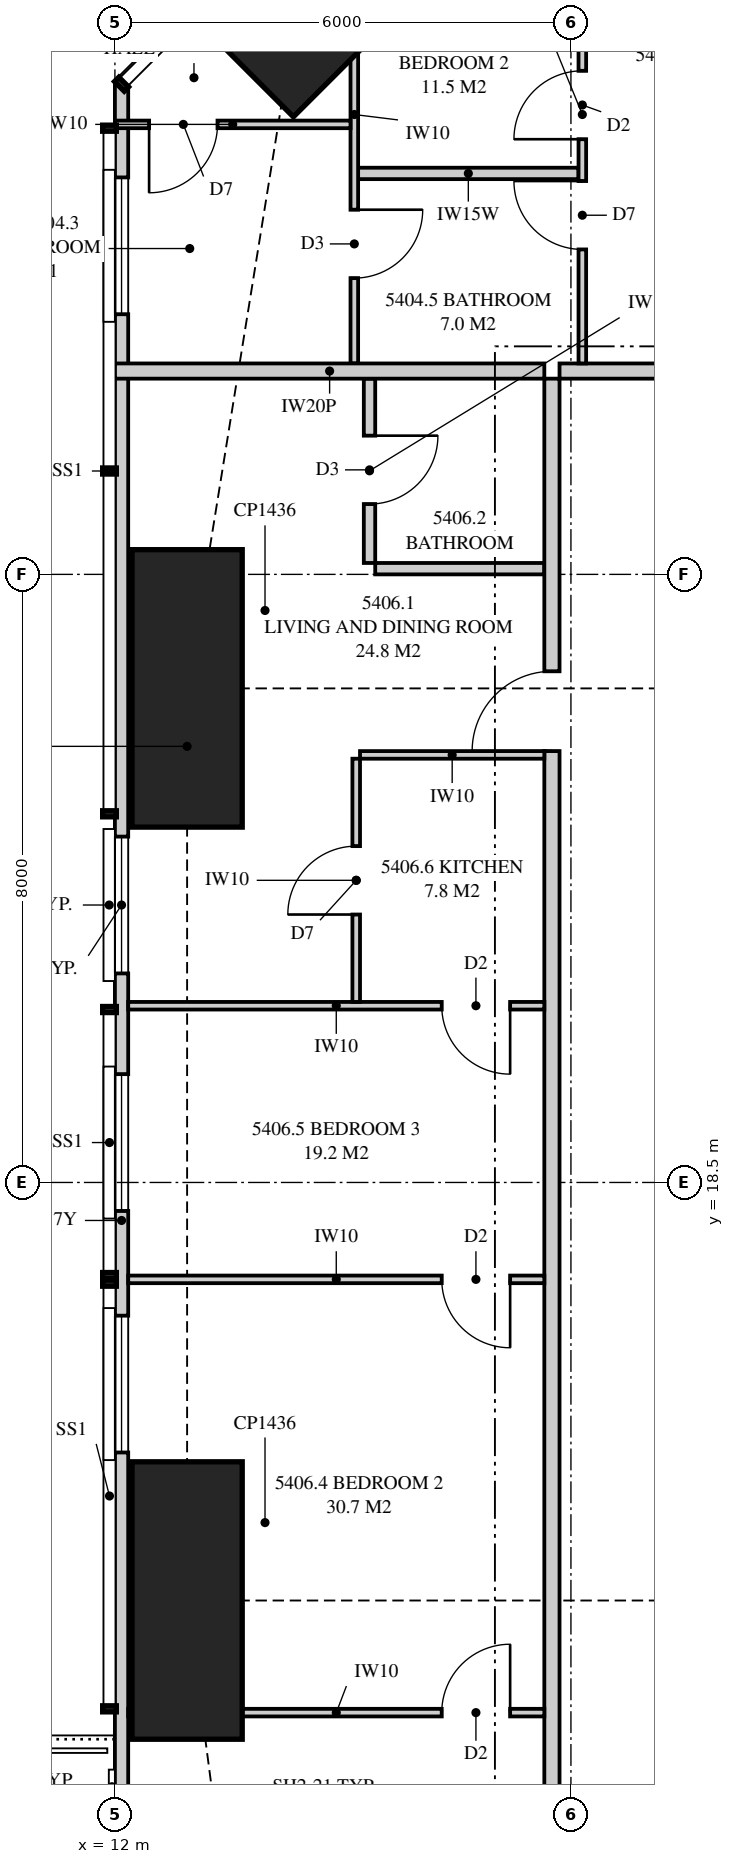
"""IFC4 building model, lengths in metres.
Left out: names, types, materials, properties, quantities, classifications, styles, units other than length and angle.
Written with IfcOpenShell. Run it as: python <this file> out.ifc"""

import sys

from ifc_helpers import new_model, si_unit, direction, frame, frame_2d, origin, origin_2d, place, context, subcontext, project, spatial, polyline, rectangle, outline, extrude, element, fill, save


model = new_model("IFC4")
c1 = context("Model", 3, precision=1e-05, world=origin(), true_north=direction((0.0, 1.0)))
c2 = subcontext(c1, "Body", "Model", "MODEL_VIEW")
j1 = project(units=[si_unit("LENGTHUNIT", "METRE"), si_unit("PLANEANGLEUNIT", "RADIAN")], contexts=[c1])
p1 = place(None, origin())
s1 = spatial("IfcSite", under=j1, at=p1, CompositionType="ELEMENT")
p2 = place(p1, origin())
s2 = spatial("IfcBuilding", under=s1, at=p2, CompositionType="ELEMENT")
p3 = place(p2, frame((0.0, 0.0, 197.9)))
s3 = spatial("IfcBuildingStorey", under=s2, at=p3, CompositionType="ELEMENT", Elevation=197.9)
p4 = place(p3, frame((14.348, 33.652, 0.0), z_axis=(0.0, 0.0, 1.0), x_axis=(0.707106781187, 0.707106781187, 0.0)))
e1 = element("IfcColumn", 1, at=p4, inside=s3, PredefinedType="COLUMN", context=c2, shape_type="SweptSolid", body=[
    extrude(rectangle(XDim=1.6, YDim=1.6, at=origin_2d()), origin(), (0.0, 0.0, 1.0), 3.35),
])
for number, where, z_axis, x_axis in (
    (2, (12.95, 25.0, 0.0), (0.0, 0.0, 1.0), (1.0, 0.0, 0.0)),
    (3, (12.95, 13.0, 0.0), (0.0, 0.0, 1.0), (1.0, 0.0, 0.0)),
):
    element("IfcColumn", number, at=place(p3, frame(where, z_axis=z_axis, x_axis=x_axis)), inside=s3, PredefinedType="COLUMN", context=c2, shape_type="SweptSolid", body=[
        extrude(rectangle(XDim=1.45, YDim=3.65, at=origin_2d()), origin(), (0.0, 0.0, 1.0), 3.35),
    ])
p5 = place(p3, frame((12.087, 32.949, 0.0), z_axis=(0.0, 0.0, 1.0), x_axis=(0.0, -1.0, 0.0)))
e4 = element("IfcWall", 4, at=p5, inside=s3, PredefinedType="SOLIDWALL", context=c2, shape_type="SweptSolid", body=[
    extrude(outline(polyline([(0.0, 0.0), (29.897, 0.0), (29.897, 3.11), (20.191, 3.11), (20.191, 2.15), (20.051, 2.15), (20.051, 3.11), (19.949, 3.11), (19.949, 2.15), (7.949, 2.15), (7.949, 3.11), (7.823, 3.11), (7.823, 2.15), (7.73, 2.15), (7.73, 3.11), (0.0, 3.11), (0.0, 0.0)])), frame((0.0, 0.087, 0.0), z_axis=(0.0, -1.0, 0.0), x_axis=(1.0, 0.0, 0.0)), (0.0, 0.0, 1.0), 0.175),
])
p6 = place(p5, frame((1.226, 0.0, 0.4)))
e5 = element("IfcOpeningElement", 5, at=p6, cuts=e4, PredefinedType="OPENING", context=c2, shape_type="SweptSolid", body=[
    extrude(rectangle(XDim=1.8, YDim=1.7, at=frame_2d((0.9, 0.85))), frame((0.0, 0.097, 0.0), z_axis=(0.0, -1.0, 0.0), x_axis=(1.0, 0.0, 0.0)), (0.0, 0.0, 1.0), 0.195),
])
p7 = place(p5, frame((9.899, 0.0, 0.4)))
e6 = element("IfcOpeningElement", 6, at=p7, cuts=e4, PredefinedType="OPENING", context=c2, shape_type="SweptSolid", body=[
    extrude(rectangle(XDim=1.8, YDim=1.7, at=frame_2d((0.9, 0.85))), frame((0.0, 0.097, 0.0), z_axis=(0.0, -1.0, 0.0), x_axis=(1.0, 0.0, 0.0)), (0.0, 0.0, 1.0), 0.195),
])
p8 = place(p5, frame((13.024, 0.0, 0.4)))
e7 = element("IfcOpeningElement", 7, at=p8, cuts=e4, PredefinedType="OPENING", context=c2, shape_type="SweptSolid", body=[
    extrude(rectangle(XDim=1.8, YDim=1.7, at=frame_2d((0.9, 0.85))), frame((0.0, 0.097, 0.0), z_axis=(0.0, -1.0, 0.0), x_axis=(1.0, 0.0, 0.0)), (0.0, 0.0, 1.0), 0.195),
])
p9 = place(p5, frame((16.201, 0.0, 0.4)))
e8 = element("IfcOpeningElement", 8, at=p9, cuts=e4, PredefinedType="OPENING", context=c2, shape_type="SweptSolid", body=[
    extrude(rectangle(XDim=1.8, YDim=1.7, at=frame_2d((0.9, 0.85))), frame((0.0, 0.097, 0.0), z_axis=(0.0, -1.0, 0.0), x_axis=(1.0, 0.0, 0.0)), (0.0, 0.0, 1.0), 0.195),
])
p10 = place(p5, frame((22.624, 0.0, 0.0)))
e9 = element("IfcOpeningElement", 9, at=p10, cuts=e4, PredefinedType="OPENING", context=c2, shape_type="SweptSolid", body=[
    extrude(rectangle(XDim=1.8, YDim=2.1, at=frame_2d((0.9, 1.05))), frame((0.0, 0.097, 0.0), z_axis=(0.0, -1.0, 0.0), x_axis=(1.0, 0.0, 0.0)), (0.0, 0.0, 1.0), 0.195),
])
p11 = place(p5, frame((26.099, 0.0, 0.4)))
e10 = element("IfcOpeningElement", 10, at=p11, cuts=e4, PredefinedType="OPENING", context=c2, shape_type="SweptSolid", body=[
    extrude(rectangle(XDim=1.2, YDim=1.7, at=frame_2d((0.6, 0.85))), frame((0.0, 0.097, 0.0), z_axis=(0.0, -1.0, 0.0), x_axis=(1.0, 0.0, 0.0)), (0.0, 0.0, 1.0), 0.195),
])
p12 = place(p3, frame((17.85, 29.175, 0.0), z_axis=(0.0, 0.0, 1.0), x_axis=(1.0, 0.0, 0.0)))
e11 = element("IfcWall", 11, at=p12, inside=s3, PredefinedType="PARTITIONING", context=c2, shape_type="SweptSolid", body=[
    extrude(rectangle(XDim=3.9, YDim=0.2, at=frame_2d((1.95, 0.0))), origin(), (0.0, 0.0, 1.0), 3.11),
])
p13 = place(p3, frame((15.15, 35.825, 0.0), z_axis=(0.0, 0.0, 1.0), x_axis=(0.0, -1.0, 0.0)))
e12 = element("IfcWall", 12, at=p13, inside=s3, PredefinedType="PARTITIONING", context=c2, shape_type="SweptSolid", body=[
    extrude(outline(polyline([(0.0, 0.0), (6.55, 0.0), (6.55, 3.11), (2.905, 3.11), (2.905, 2.15), (1.158, 2.15), (1.158, 3.11), (0.0, 3.11), (0.0, 0.0)])), frame((0.0, 0.05, 0.0), z_axis=(0.0, -1.0, 0.0), x_axis=(1.0, 0.0, 0.0)), (0.0, 0.0, 1.0), 0.1),
])
p14 = place(p13, frame((0.355, 0.0, 0.0)))
e13 = element("IfcOpeningElement", 13, at=p14, cuts=e12, PredefinedType="OPENING", context=c2, shape_type="SweptSolid", body=[
    extrude(rectangle(XDim=0.9, YDim=2.1, at=frame_2d((0.45, 1.05))), frame((0.0, 0.06, 0.0), z_axis=(0.0, -1.0, 0.0), x_axis=(1.0, 0.0, 0.0)), (0.0, 0.0, 1.0), 0.12),
])
p15 = place(p13, frame((4.527, 0.0, 0.0)))
e14 = element("IfcOpeningElement", 14, at=p15, cuts=e12, PredefinedType="OPENING", context=c2, shape_type="SweptSolid", body=[
    extrude(rectangle(XDim=0.9, YDim=2.1, at=frame_2d((0.45, 1.05))), frame((0.0, 0.06, 0.0), z_axis=(0.0, -1.0, 0.0), x_axis=(1.0, 0.0, 0.0)), (0.0, 0.0, 1.0), 0.12),
])
p16 = place(p3, frame((18.15, 35.825, 0.0), z_axis=(0.0, 0.0, 1.0), x_axis=(0.0, -1.0, 0.0)))
e15 = element("IfcWall", 15, at=p16, inside=s3, PredefinedType="PARTITIONING", context=c2, shape_type="SweptSolid", body=[
    extrude(outline(polyline([(0.0, 0.0), (6.55, 0.0), (6.55, 3.11), (2.374, 3.11), (2.374, 2.15), (0.627, 2.15), (0.627, 3.11), (0.0, 3.11), (0.0, 0.0)])), frame((0.0, 0.05, 0.0), z_axis=(0.0, -1.0, 0.0), x_axis=(1.0, 0.0, 0.0)), (0.0, 0.0, 1.0), 0.1),
])
p17 = place(p16, frame((2.7, 0.0, 0.0)))
e16 = element("IfcOpeningElement", 16, at=p17, cuts=e15, PredefinedType="OPENING", context=c2, shape_type="SweptSolid", body=[
    extrude(rectangle(XDim=0.9, YDim=2.1, at=frame_2d((0.45, 1.05))), frame((0.0, 0.06, 0.0), z_axis=(0.0, -1.0, 0.0), x_axis=(1.0, 0.0, 0.0)), (0.0, 0.0, 1.0), 0.12),
])
p18 = place(p16, frame((4.15, 0.0, 0.0)))
e17 = element("IfcOpeningElement", 17, at=p18, cuts=e15, PredefinedType="OPENING", context=c2, shape_type="SweptSolid", body=[
    extrude(rectangle(XDim=0.9, YDim=2.1, at=frame_2d((0.45, 1.05))), frame((0.0, 0.06, 0.0), z_axis=(0.0, -1.0, 0.0), x_axis=(1.0, 0.0, 0.0)), (0.0, 0.0, 1.0), 0.12),
])
p19 = place(p3, frame((12.0, 32.42, 0.0), z_axis=(0.0, 0.0, 1.0), x_axis=(1.0, 0.0, 0.0)))
e18 = element("IfcWall", 18, at=p19, inside=s3, PredefinedType="PARTITIONING", context=c2, shape_type="SweptSolid", body=[
    extrude(outline(polyline([(0.0, 0.0), (3.1, 0.0), (3.1, 3.11), (3.021, 3.11), (3.021, 2.15), (1.278, 2.15), (1.278, 3.11), (0.0, 3.11), (0.0, 0.0)])), frame((0.0, 0.05, 0.0), z_axis=(0.0, -1.0, 0.0), x_axis=(1.0, 0.0, 0.0)), (0.0, 0.0, 1.0), 0.1),
])
p20 = place(p19, frame((0.45, 0.0, 0.0)))
e19 = element("IfcOpeningElement", 19, at=p20, cuts=e18, PredefinedType="OPENING", context=c2, shape_type="SweptSolid", body=[
    extrude(rectangle(XDim=0.9, YDim=2.1, at=frame_2d((0.45, 1.05))), frame((0.0, 0.06, 0.0), z_axis=(0.0, -1.0, 0.0), x_axis=(1.0, 0.0, 0.0)), (0.0, 0.0, 1.0), 0.12),
])
p21 = place(p3, frame((15.2, 31.775, 0.0), z_axis=(0.0, 0.0, 1.0), x_axis=(1.0, 0.0, 0.0)))
e20 = element("IfcWall", 20, at=p21, inside=s3, PredefinedType="PLUMBINGWALL", context=c2, shape_type="SweptSolid", body=[
    extrude(rectangle(XDim=2.9, YDim=0.15, at=frame_2d((1.45, 0.0))), origin(), (0.0, 0.0, 1.0), 3.11),
])
p22 = place(p3, frame((12.0, 29.175, 0.0), z_axis=(0.0, 0.0, 1.0), x_axis=(1.0, 0.0, 0.0)))
e21 = element("IfcWall", 21, at=p22, inside=s3, PredefinedType="PARTITIONING", context=c2, shape_type="SweptSolid", body=[
    extrude(outline(polyline([(0.0, 0.0), (5.65, 0.0), (5.65, 3.11), (2.547, 3.11), (2.547, 2.15), (0.703, 2.15), (0.703, 3.11), (0.0, 3.11), (0.0, 0.0)])), frame((0.0, 0.1, 0.0), z_axis=(0.0, -1.0, 0.0), x_axis=(1.0, 0.0, 0.0)), (0.0, 0.0, 1.0), 0.2),
])
p23 = place(p3, frame((17.75, 7.925, 0.0), z_axis=(0.0, 0.0, 1.0), x_axis=(0.0, 1.0, 0.0)))
e22 = element("IfcWall", 22, at=p23, inside=s3, PredefinedType="PARTITIONING", context=c2, shape_type="SweptSolid", body=[
    extrude(outline(polyline([(0.0, 0.0), (21.15, 0.0), (21.15, 3.11), (17.412, 3.11), (17.412, 2.541), (16.738, 2.541), (16.738, 3.11), (5.412, 3.11), (5.412, 2.541), (4.738, 2.541), (4.738, 3.11), (0.0, 3.11), (0.0, 0.0)])), frame((0.0, 0.1, 0.0), z_axis=(0.0, -1.0, 0.0), x_axis=(1.0, 0.0, 0.0)), (0.0, 0.0, 1.0), 0.2),
])
p24 = place(p23, frame((16.25, 0.0, 0.0)))
e23 = element("IfcOpeningElement", 23, at=p24, cuts=e22, PredefinedType="OPENING", context=c2, shape_type="SweptSolid", body=[
    extrude(rectangle(XDim=1.05, YDim=2.2, at=frame_2d((0.525, 1.1))), frame((0.0, 0.11, 0.0), z_axis=(0.0, -1.0, 0.0), x_axis=(1.0, 0.0, 0.0)), (0.0, 0.0, 1.0), 0.22),
])
p25 = place(p3, frame((15.35, 26.65, 0.0), z_axis=(0.0, 0.0, 1.0), x_axis=(0.0, 1.0, 0.0)))
e24 = element("IfcWall", 24, at=p25, inside=s3, PredefinedType="PLUMBINGWALL", context=c2, shape_type="SweptSolid", body=[
    extrude(rectangle(XDim=2.425, YDim=0.15, at=frame_2d((1.212, 0.0))), origin(), (0.0, 0.0, 1.0), 3.11),
])
p26 = place(p25, frame((0.775, 0.0, 0.0)))
e25 = element("IfcOpeningElement", 25, at=p26, cuts=e24, PredefinedType="OPENING", context=c2, shape_type="SweptSolid", body=[
    extrude(rectangle(XDim=0.9, YDim=2.1, at=frame_2d((0.45, 1.05))), frame((0.0, 0.085, 0.0), z_axis=(0.0, -1.0, 0.0), x_axis=(1.0, 0.0, 0.0)), (0.0, 0.0, 1.0), 0.17),
])
p27 = place(p3, frame((15.425, 26.575, 0.0), z_axis=(0.0, 0.0, 1.0), x_axis=(1.0, 0.0, 0.0)))
e26 = element("IfcWall", 26, at=p27, inside=s3, PredefinedType="PLUMBINGWALL", context=c2, shape_type="SweptSolid", body=[
    extrude(rectangle(XDim=2.225, YDim=0.15, at=frame_2d((1.112, 0.0))), origin(), (0.0, 0.0, 1.0), 3.11),
])
p28 = place(p3, frame((12.175, 11.525, 0.0), z_axis=(0.0, 0.0, 1.0), x_axis=(1.0, 0.0, 0.0)))
e27 = element("IfcWall", 27, at=p28, inside=s3, PredefinedType="PARTITIONING", context=c2, shape_type="SweptSolid", body=[
    extrude(outline(polyline([(0.0, 0.0), (5.475, 0.0), (5.475, 3.11), (1.836, 3.11), (1.836, 2.15), (0.101, 2.15), (0.101, 3.11), (0.0, 3.11), (0.0, 0.0)])), frame((0.0, 0.05, 0.0), z_axis=(0.0, -1.0, 0.0), x_axis=(1.0, 0.0, 0.0)), (0.0, 0.0, 1.0), 0.1),
])
p29 = place(p28, frame((4.125, 0.0, 0.0)))
e28 = element("IfcOpeningElement", 28, at=p29, cuts=e27, PredefinedType="OPENING", context=c2, shape_type="SweptSolid", body=[
    extrude(rectangle(XDim=0.9, YDim=2.1, at=frame_2d((0.45, 1.05))), frame((0.0, 0.06, 0.0), z_axis=(0.0, -1.0, 0.0), x_axis=(1.0, 0.0, 0.0)), (0.0, 0.0, 1.0), 0.12),
])
p30 = place(p3, frame((12.175, 17.225, 0.0), z_axis=(0.0, 0.0, 1.0), x_axis=(1.0, 0.0, 0.0)))
e29 = element("IfcWall", 29, at=p30, inside=s3, PredefinedType="PARTITIONING", context=c2, shape_type="SweptSolid", body=[
    extrude(outline(polyline([(0.0, 0.0), (5.475, 0.0), (5.475, 3.11), (1.635, 3.11), (1.635, 2.15), (0.0, 2.15), (0.0, 3.11), (0.0, 0.0)])), frame((0.0, 0.05, 0.0), z_axis=(0.0, -1.0, 0.0), x_axis=(1.0, 0.0, 0.0)), (0.0, 0.0, 1.0), 0.1),
])
p31 = place(p30, frame((4.125, 0.0, 0.0)))
e30 = element("IfcOpeningElement", 30, at=p31, cuts=e29, PredefinedType="OPENING", context=c2, shape_type="SweptSolid", body=[
    extrude(rectangle(XDim=0.9, YDim=2.1, at=frame_2d((0.45, 1.05))), frame((0.0, 0.06, 0.0), z_axis=(0.0, -1.0, 0.0), x_axis=(1.0, 0.0, 0.0)), (0.0, 0.0, 1.0), 0.12),
])
p32 = place(p3, frame((12.175, 20.825, 0.0), z_axis=(0.0, 0.0, 1.0), x_axis=(1.0, 0.0, 0.0)))
e31 = element("IfcWall", 31, at=p32, inside=s3, PredefinedType="PARTITIONING", context=c2, shape_type="SweptSolid", body=[
    extrude(outline(polyline([(0.0, 0.0), (5.475, 0.0), (5.475, 3.11), (1.635, 3.11), (1.635, 2.15), (0.0, 2.15), (0.0, 3.11), (0.0, 0.0)])), frame((0.0, 0.05, 0.0), z_axis=(0.0, -1.0, 0.0), x_axis=(1.0, 0.0, 0.0)), (0.0, 0.0, 1.0), 0.1),
])
p33 = place(p32, frame((4.125, 0.0, 0.0)))
e32 = element("IfcOpeningElement", 32, at=p33, cuts=e31, PredefinedType="OPENING", context=c2, shape_type="SweptSolid", body=[
    extrude(rectangle(XDim=0.9, YDim=2.1, at=frame_2d((0.45, 1.05))), frame((0.0, 0.06, 0.0), z_axis=(0.0, -1.0, 0.0), x_axis=(1.0, 0.0, 0.0)), (0.0, 0.0, 1.0), 0.12),
])
p34 = place(p3, frame((15.175, 20.875, 0.0), z_axis=(0.0, 0.0, 1.0), x_axis=(0.0, 1.0, 0.0)))
e33 = element("IfcWall", 33, at=p34, inside=s3, PredefinedType="PARTITIONING", context=c2, shape_type="SweptSolid", body=[
    extrude(rectangle(XDim=3.2, YDim=0.1, at=frame_2d((1.6, 0.0))), origin(), (0.0, 0.0, 1.0), 3.11),
])
p35 = place(p34, frame((1.15, 0.0, 0.0)))
e34 = element("IfcOpeningElement", 34, at=p35, cuts=e33, PredefinedType="OPENING", context=c2, shape_type="SweptSolid", body=[
    extrude(rectangle(XDim=0.9, YDim=2.1, at=frame_2d((0.45, 1.05))), frame((0.0, 0.06, 0.0), z_axis=(0.0, -1.0, 0.0), x_axis=(1.0, 0.0, 0.0)), (0.0, 0.0, 1.0), 0.12),
])
p36 = place(p3, frame((15.225, 24.125, 0.0), z_axis=(0.0, 0.0, 1.0), x_axis=(1.0, 0.0, 0.0)))
e35 = element("IfcWall", 35, at=p36, inside=s3, PredefinedType="PARTITIONING", context=c2, shape_type="SweptSolid", body=[
    extrude(rectangle(XDim=2.425, YDim=0.1, at=frame_2d((1.212, 0.0))), origin(), (0.0, 0.0, 1.0), 3.11),
])
p37 = place(p6, origin())
e36 = element("IfcWindow", 36, at=p37, inside=s3, PartitioningType="SINGLE_PANEL", PredefinedType="WINDOW", context=c2, shape_type="SweptSolid", body=[
    extrude(rectangle(XDim=1.8, YDim=1.7, at=frame_2d((0.9, 0.85))), frame((0.0, 0.03, 0.0), z_axis=(0.0, -1.0, 0.0), x_axis=(1.0, 0.0, 0.0)), (0.0, 0.0, 1.0), 0.06),
])
fill(e5, e36)
p38 = place(p7, origin())
e37 = element("IfcWindow", 37, at=p38, inside=s3, PartitioningType="SINGLE_PANEL", PredefinedType="WINDOW", context=c2, shape_type="SweptSolid", body=[
    extrude(rectangle(XDim=1.8, YDim=1.7, at=frame_2d((0.9, 0.85))), frame((0.0, 0.03, 0.0), z_axis=(0.0, -1.0, 0.0), x_axis=(1.0, 0.0, 0.0)), (0.0, 0.0, 1.0), 0.06),
])
fill(e6, e37)
p39 = place(p8, origin())
e38 = element("IfcWindow", 38, at=p39, inside=s3, PartitioningType="SINGLE_PANEL", PredefinedType="WINDOW", context=c2, shape_type="SweptSolid", body=[
    extrude(rectangle(XDim=1.8, YDim=1.7, at=frame_2d((0.9, 0.85))), frame((0.0, 0.03, 0.0), z_axis=(0.0, -1.0, 0.0), x_axis=(1.0, 0.0, 0.0)), (0.0, 0.0, 1.0), 0.06),
])
fill(e7, e38)
p40 = place(p9, origin())
e39 = element("IfcWindow", 39, at=p40, inside=s3, PartitioningType="SINGLE_PANEL", PredefinedType="WINDOW", context=c2, shape_type="SweptSolid", body=[
    extrude(rectangle(XDim=1.8, YDim=1.7, at=frame_2d((0.9, 0.85))), frame((0.0, 0.03, 0.0), z_axis=(0.0, -1.0, 0.0), x_axis=(1.0, 0.0, 0.0)), (0.0, 0.0, 1.0), 0.06),
])
fill(e8, e39)
p41 = place(p20, frame((0.9, 0.0, 0.0), z_axis=(0.0, 0.0, 1.0), x_axis=(-1.0, 0.0, 0.0)))
e40 = element("IfcDoor", 40, at=p41, inside=s3, OperationType="SINGLE_SWING_RIGHT", PredefinedType="DOOR", context=c2, shape_type="SweptSolid", body=[
    extrude(rectangle(XDim=0.9, YDim=2.1, at=frame_2d((0.45, 1.05))), frame((0.0, 0.025, 0.0), z_axis=(0.0, -1.0, 0.0), x_axis=(1.0, 0.0, 0.0)), (0.0, 0.0, 1.0), 0.05),
])
fill(e19, e40)
p42 = place(p17, frame((0.9, 0.0, 0.0), z_axis=(0.0, 0.0, 1.0), x_axis=(-1.0, 0.0, 0.0)))
e41 = element("IfcDoor", 41, at=p42, inside=s3, OperationType="SINGLE_SWING_LEFT", PredefinedType="DOOR", context=c2, shape_type="SweptSolid", body=[
    extrude(rectangle(XDim=0.9, YDim=2.1, at=frame_2d((0.45, 1.05))), frame((0.0, 0.025, 0.0), z_axis=(0.0, -1.0, 0.0), x_axis=(1.0, 0.0, 0.0)), (0.0, 0.0, 1.0), 0.05),
])
fill(e16, e41)
p43 = place(p18, frame((0.9, 0.0, 0.0), z_axis=(0.0, 0.0, 1.0), x_axis=(-1.0, 0.0, 0.0)))
e42 = element("IfcDoor", 42, at=p43, inside=s3, OperationType="SINGLE_SWING_RIGHT", PredefinedType="DOOR", context=c2, shape_type="SweptSolid", body=[
    extrude(rectangle(XDim=0.9, YDim=2.1, at=frame_2d((0.45, 1.05))), frame((0.0, 0.025, 0.0), z_axis=(0.0, -1.0, 0.0), x_axis=(1.0, 0.0, 0.0)), (0.0, 0.0, 1.0), 0.05),
])
fill(e17, e42)
p44 = place(p15, origin())
e43 = element("IfcDoor", 43, at=p44, inside=s3, OperationType="SINGLE_SWING_LEFT", PredefinedType="DOOR", context=c2, shape_type="SweptSolid", body=[
    extrude(rectangle(XDim=0.9, YDim=2.1, at=frame_2d((0.45, 1.05))), frame((0.0, 0.025, 0.0), z_axis=(0.0, -1.0, 0.0), x_axis=(1.0, 0.0, 0.0)), (0.0, 0.0, 1.0), 0.05),
])
fill(e14, e43)
p45 = place(p24, origin())
e44 = element("IfcDoor", 44, at=p45, inside=s3, OperationType="SINGLE_SWING_LEFT", PredefinedType="DOOR", context=c2, shape_type="SweptSolid", body=[
    extrude(rectangle(XDim=1.05, YDim=2.2, at=frame_2d((0.525, 1.1))), frame((0.0, 0.025, 0.0), z_axis=(0.0, -1.0, 0.0), x_axis=(1.0, 0.0, 0.0)), (0.0, 0.0, 1.0), 0.05),
])
fill(e23, e44)
p46 = place(p26, frame((0.9, 0.0, 0.0), z_axis=(0.0, 0.0, 1.0), x_axis=(-1.0, 0.0, 0.0)))
e45 = element("IfcDoor", 45, at=p46, inside=s3, OperationType="SINGLE_SWING_LEFT", PredefinedType="DOOR", context=c2, shape_type="SweptSolid", body=[
    extrude(rectangle(XDim=0.9, YDim=2.1, at=frame_2d((0.45, 1.05))), frame((0.0, 0.025, 0.0), z_axis=(0.0, -1.0, 0.0), x_axis=(1.0, 0.0, 0.0)), (0.0, 0.0, 1.0), 0.05),
])
fill(e25, e45)
p47 = place(p29, origin())
e46 = element("IfcDoor", 46, at=p47, inside=s3, OperationType="SINGLE_SWING_RIGHT", PredefinedType="DOOR", context=c2, shape_type="SweptSolid", body=[
    extrude(rectangle(XDim=0.9, YDim=2.1, at=frame_2d((0.45, 1.05))), frame((0.0, 0.025, 0.0), z_axis=(0.0, -1.0, 0.0), x_axis=(1.0, 0.0, 0.0)), (0.0, 0.0, 1.0), 0.05),
])
fill(e28, e46)
p48 = place(p31, frame((0.9, 0.0, 0.0), z_axis=(0.0, 0.0, 1.0), x_axis=(-1.0, 0.0, 0.0)))
e47 = element("IfcDoor", 47, at=p48, inside=s3, OperationType="SINGLE_SWING_LEFT", PredefinedType="DOOR", context=c2, shape_type="SweptSolid", body=[
    extrude(rectangle(XDim=0.9, YDim=2.1, at=frame_2d((0.45, 1.05))), frame((0.0, 0.025, 0.0), z_axis=(0.0, -1.0, 0.0), x_axis=(1.0, 0.0, 0.0)), (0.0, 0.0, 1.0), 0.05),
])
fill(e30, e47)
p49 = place(p33, frame((0.9, 0.0, 0.0), z_axis=(0.0, 0.0, 1.0), x_axis=(-1.0, 0.0, 0.0)))
e48 = element("IfcDoor", 48, at=p49, inside=s3, OperationType="SINGLE_SWING_LEFT", PredefinedType="DOOR", context=c2, shape_type="SweptSolid", body=[
    extrude(rectangle(XDim=0.9, YDim=2.1, at=frame_2d((0.45, 1.05))), frame((0.0, 0.025, 0.0), z_axis=(0.0, -1.0, 0.0), x_axis=(1.0, 0.0, 0.0)), (0.0, 0.0, 1.0), 0.05),
])
fill(e32, e48)
p50 = place(p35, origin())
e49 = element("IfcDoor", 49, at=p50, inside=s3, OperationType="SINGLE_SWING_LEFT", PredefinedType="DOOR", context=c2, shape_type="SweptSolid", body=[
    extrude(rectangle(XDim=0.9, YDim=2.1, at=frame_2d((0.45, 1.05))), frame((0.0, 0.025, 0.0), z_axis=(0.0, -1.0, 0.0), x_axis=(1.0, 0.0, 0.0)), (0.0, 0.0, 1.0), 0.05),
])
fill(e34, e49)
save(model, sys.argv[1])
